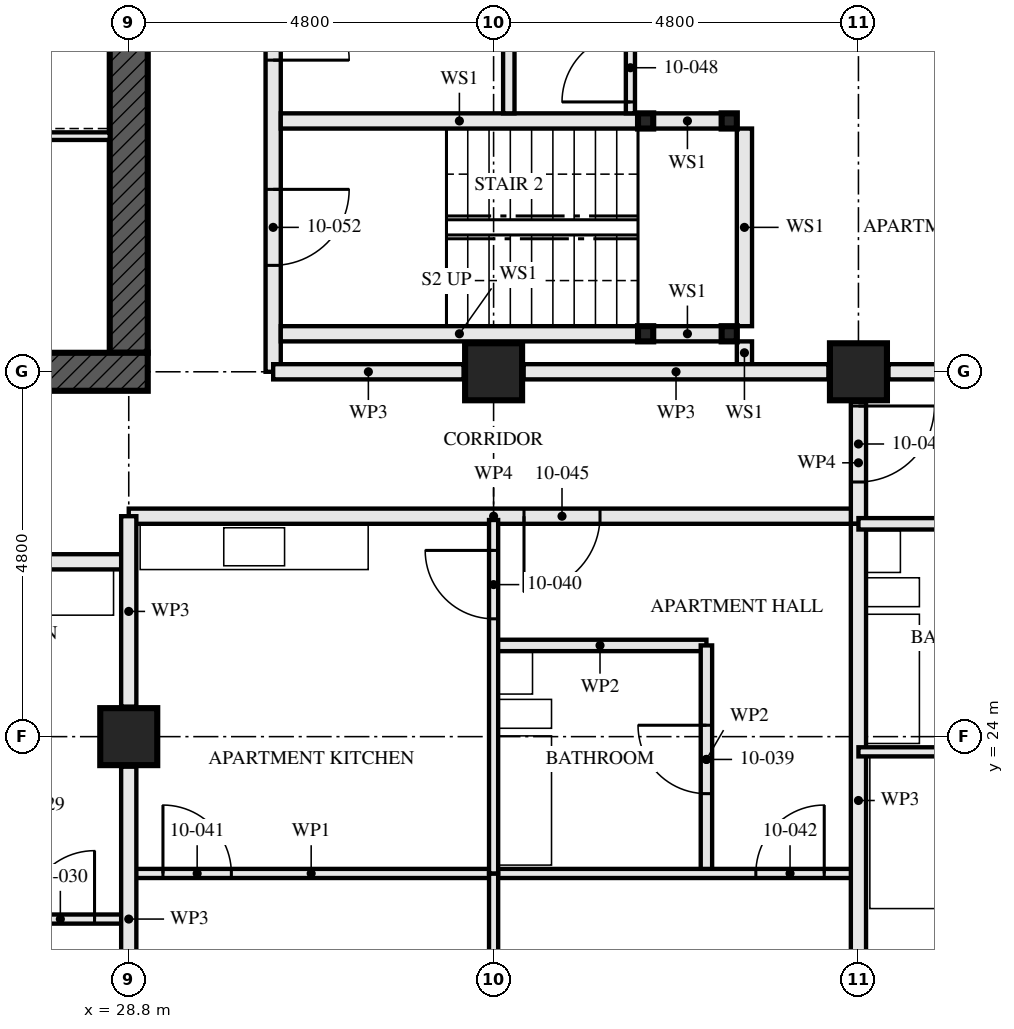
"""IFC4 building model, lengths in metres.
Left out: names, types, materials, properties, quantities, classifications, styles, units other than length and angle.
Written with IfcOpenShell. Run it as: python <this file> out.ifc"""

import sys

from ifc_helpers import new_model, si_unit, direction, frame, frame_2d, origin, origin_2d, place, context, subcontext, project, spatial, rectangle, hollow_rectangle, extrude, element, fill, save


model = new_model("IFC4")
c1 = context("Model", 3, precision=1e-05, world=origin(), true_north=direction((0.0, 1.0)))
c2 = subcontext(c1, "Body", "Model", "MODEL_VIEW")
j1 = project(units=[si_unit("LENGTHUNIT", "METRE"), si_unit("PLANEANGLEUNIT", "RADIAN")], contexts=[c1])
p1 = place(None, origin())
s1 = spatial("IfcSite", under=j1, at=p1, CompositionType="ELEMENT")
p2 = place(p1, origin())
s2 = spatial("IfcBuilding", under=s1, at=p2, CompositionType="ELEMENT")
p3 = place(p2, frame((0.0, 0.0, 41.0)))
s3 = spatial("IfcBuildingStorey", under=s2, at=p3, CompositionType="ELEMENT", Elevation=41.0)
for number, where, z_axis, x_axis in (
    (1, (28.8, 24.0, 0.0), (0.0, 0.0, 1.0), (1.0, 0.0, 0.0)),
    (2, (33.6, 28.8, 0.0), (0.0, 0.0, 1.0), (0.0, 1.0, 0.0)),
    (3, (38.4, 28.8, 0.0), (0.0, 0.0, 1.0), (0.0, 1.0, 0.0)),
):
    element("IfcColumn", number, at=place(p3, frame(where, z_axis=z_axis, x_axis=x_axis)), inside=s3, PredefinedType="COLUMN", context=c2, shape_type="SweptSolid", body=[
        extrude(hollow_rectangle(XDim=0.75, YDim=0.75, WallThickness=0.08, at=origin_2d()), origin(), (0.0, 0.0, 1.0), 3.5),
    ])
p4 = place(p3, frame((14.15, 28.8, -0.17), z_axis=(0.0, 0.0, 1.0), x_axis=(1.0, 0.0, 0.0)))
e4 = element("IfcWall", 4, at=p4, inside=s3, PredefinedType="SHEAR", context=c2, shape_type="SweptSolid", body=[
    extrude(rectangle(XDim=14.9, YDim=0.5, at=frame_2d((7.45, 0.0))), origin(), (0.0, 0.0, 1.0), 3.5),
])
p5 = place(p4, frame((6.85, 0.0, 0.17)))
e5 = element("IfcOpeningElement", 5, at=p5, cuts=e4, PredefinedType="OPENING", context=c2, shape_type="SweptSolid", body=[
    extrude(rectangle(XDim=1.2, YDim=2.1, at=frame_2d((0.6, 1.05))), frame((0.0, 0.26, 0.0), z_axis=(0.0, -1.0, 0.0), x_axis=(1.0, 0.0, 0.0)), (0.0, 0.0, 1.0), 0.521),
])
p6 = place(p3, frame((28.8, 29.05, -0.17), z_axis=(0.0, 0.0, 1.0), x_axis=(0.0, 1.0, 0.0)))
e6 = element("IfcWall", 6, at=p6, inside=s3, PredefinedType="SHEAR", context=c2, shape_type="SweptSolid", body=[
    extrude(rectangle(XDim=13.9, YDim=0.5, at=frame_2d((6.95, 0.0))), origin(), (0.0, 0.0, 1.0), 3.5),
])
p7 = place(p6, frame((6.35, 0.0, 0.17)))
e7 = element("IfcOpeningElement", 7, at=p7, cuts=e6, PredefinedType="OPENING", context=c2, shape_type="SweptSolid", body=[
    extrude(rectangle(XDim=1.2, YDim=2.1, at=frame_2d((0.6, 1.05))), frame((0.0, 0.26, 0.0), z_axis=(0.0, -1.0, 0.0), x_axis=(1.0, 0.0, 0.0)), (0.0, 0.0, 1.0), 0.521),
])
for number, where, z_axis, x_axis in (
    (8, (36.7, 29.3, 0.0), (0.0, 0.0, 1.0), (1.0, 0.0, 0.0)),
    (9, (36.7, 32.1, 0.0), (0.0, 0.0, 1.0), (1.0, 0.0, 0.0)),
    (10, (35.6, 29.3, 0.0), (0.0, 0.0, 1.0), (1.0, 0.0, 0.0)),
    (11, (35.6, 32.1, 0.0), (0.0, 0.0, 1.0), (1.0, 0.0, 0.0)),
):
    element("IfcColumn", number, at=place(p3, frame(where, z_axis=z_axis, x_axis=x_axis)), inside=s3, PredefinedType="COLUMN", context=c2, shape_type="SweptSolid", body=[
        extrude(hollow_rectangle(XDim=0.2, YDim=0.2, WallThickness=0.008, at=origin_2d()), origin(), (0.0, 0.0, 1.0), 3.33),
    ])
p8 = place(p3, frame((24.0, 21.6, 0.0), z_axis=(0.0, 0.0, 1.0), x_axis=(1.0, 0.0, 0.0)))
e12 = element("IfcWall", 12, at=p8, inside=s3, PredefinedType="PARTITIONING", context=c2, shape_type="SweptSolid", body=[
    extrude(rectangle(XDim=4.8, YDim=0.12, at=frame_2d((2.4, 0.0))), origin(), (0.0, 0.0, 1.0), 3.33),
])
p9 = place(p8, frame((3.45, 0.0, 0.0)))
e13 = element("IfcOpeningElement", 13, at=p9, cuts=e12, PredefinedType="OPENING", context=c2, shape_type="SweptSolid", body=[
    extrude(rectangle(XDim=0.9, YDim=2.1, at=frame_2d((0.45, 1.05))), frame((0.0, 0.071, 0.0), z_axis=(0.0, -1.0, 0.0), x_axis=(1.0, 0.0, 0.0)), (0.0, 0.0, 1.0), 0.141),
])
p10 = place(p3, frame((17.8, 26.3, 0.0), z_axis=(0.0, 0.0, 1.0), x_axis=(1.0, 0.0, 0.0)))
e14 = element("IfcWall", 14, at=p10, inside=s3, PredefinedType="PARTITIONING", context=c2, shape_type="SweptSolid", body=[
    extrude(rectangle(XDim=11.0, YDim=0.2, at=frame_2d((5.5, 0.0))), origin(), (0.0, 0.0, 1.0), 2.55),
])
p11 = place(p10, frame((1.8, 0.0, 0.0)))
e15 = element("IfcOpeningElement", 15, at=p11, cuts=e14, PredefinedType="OPENING", context=c2, shape_type="SweptSolid", body=[
    extrude(rectangle(XDim=1.0, YDim=2.1, at=frame_2d((0.5, 1.05))), frame((0.0, 0.111, 0.0), z_axis=(0.0, -1.0, 0.0), x_axis=(1.0, 0.0, 0.0)), (0.0, 0.0, 1.0), 0.221),
])
p12 = place(p10, frame((6.6, 0.0, 0.0)))
e16 = element("IfcOpeningElement", 16, at=p12, cuts=e14, PredefinedType="OPENING", context=c2, shape_type="SweptSolid", body=[
    extrude(rectangle(XDim=1.0, YDim=2.1, at=frame_2d((0.5, 1.05))), frame((0.0, 0.111, 0.0), z_axis=(0.0, -1.0, 0.0), x_axis=(1.0, 0.0, 0.0)), (0.0, 0.0, 1.0), 0.221),
])
p13 = place(p3, frame((36.4, 22.2, 0.0), z_axis=(0.0, 0.0, 1.0), x_axis=(0.0, 1.0, 0.0)))
e17 = element("IfcWall", 17, at=p13, inside=s3, PredefinedType="PARTITIONING", context=c2, shape_type="SweptSolid", body=[
    extrude(rectangle(XDim=3.0, YDim=0.15, at=frame_2d((1.5, 0.0))), origin(), (0.0, 0.0, 1.0), 2.55),
])
p14 = place(p13, frame((1.05, 0.0, 0.0)))
e18 = element("IfcOpeningElement", 18, at=p14, cuts=e17, PredefinedType="OPENING", context=c2, shape_type="SweptSolid", body=[
    extrude(rectangle(XDim=0.9, YDim=2.1, at=frame_2d((0.45, 1.05))), frame((0.0, 0.085, 0.0), z_axis=(0.0, -1.0, 0.0), x_axis=(1.0, 0.0, 0.0)), (0.0, 0.0, 1.0), 0.171),
])
p15 = place(p3, frame((33.6, 25.2, 0.0), z_axis=(0.0, 0.0, 1.0), x_axis=(1.0, 0.0, 0.0)))
e19 = element("IfcWall", 19, at=p15, inside=s3, PredefinedType="PARTITIONING", context=c2, shape_type="SweptSolid", body=[
    extrude(rectangle(XDim=2.8, YDim=0.15, at=frame_2d((1.4, 0.0))), origin(), (0.0, 0.0, 1.0), 3.33),
])
p16 = place(p3, frame((33.6, 22.2, 0.0), z_axis=(0.0, 0.0, 1.0), x_axis=(0.0, 1.0, 0.0)))
e20 = element("IfcWall", 20, at=p16, inside=s3, PredefinedType="PARTITIONING", context=c2, shape_type="SweptSolid", body=[
    extrude(rectangle(XDim=4.65, YDim=0.12, at=frame_2d((2.325, 0.0))), origin(), (0.0, 0.0, 1.0), 2.55),
])
p17 = place(p16, frame((3.35, 0.0, 0.0)))
e21 = element("IfcOpeningElement", 21, at=p17, cuts=e20, PredefinedType="OPENING", context=c2, shape_type="SweptSolid", body=[
    extrude(rectangle(XDim=0.9, YDim=2.1, at=frame_2d((0.45, 1.05))), frame((0.0, 0.071, 0.0), z_axis=(0.0, -1.0, 0.0), x_axis=(1.0, 0.0, 0.0)), (0.0, 0.0, 1.0), 0.141),
])
p18 = place(p3, frame((28.8, 22.2, 0.0), z_axis=(0.0, 0.0, 1.0), x_axis=(1.0, 0.0, 0.0)))
e22 = element("IfcWall", 22, at=p18, inside=s3, PredefinedType="PARTITIONING", context=c2, shape_type="SweptSolid", body=[
    extrude(rectangle(XDim=4.8, YDim=0.12, at=frame_2d((2.4, 0.0))), origin(), (0.0, 0.0, 1.0), 3.33),
])
p19 = place(p18, frame((0.45, 0.0, 0.0)))
e23 = element("IfcOpeningElement", 23, at=p19, cuts=e22, PredefinedType="OPENING", context=c2, shape_type="SweptSolid", body=[
    extrude(rectangle(XDim=0.9, YDim=2.1, at=frame_2d((0.45, 1.05))), frame((0.0, 0.071, 0.0), z_axis=(0.0, -1.0, 0.0), x_axis=(1.0, 0.0, 0.0)), (0.0, 0.0, 1.0), 0.141),
])
p20 = place(p3, frame((33.6, 22.2, 0.0), z_axis=(0.0, 0.0, 1.0), x_axis=(1.0, 0.0, 0.0)))
e24 = element("IfcWall", 24, at=p20, inside=s3, PredefinedType="PARTITIONING", context=c2, shape_type="SweptSolid", body=[
    extrude(rectangle(XDim=4.8, YDim=0.12, at=frame_2d((2.4, 0.0))), origin(), (0.0, 0.0, 1.0), 3.33),
])
p21 = place(p20, frame((3.45, 0.0, 0.0)))
e25 = element("IfcOpeningElement", 25, at=p21, cuts=e24, PredefinedType="OPENING", context=c2, shape_type="SweptSolid", body=[
    extrude(rectangle(XDim=0.9, YDim=2.1, at=frame_2d((0.45, 1.05))), frame((0.0, 0.071, 0.0), z_axis=(0.0, -1.0, 0.0), x_axis=(1.0, 0.0, 0.0)), (0.0, 0.0, 1.0), 0.141),
])
p22 = place(p3, frame((33.6, 14.72, 0.0), z_axis=(0.0, 0.0, 1.0), x_axis=(0.0, 1.0, 0.0)))
e26 = element("IfcWall", 26, at=p22, inside=s3, PredefinedType="PARTITIONING", context=c2, shape_type="SweptSolid", body=[
    extrude(rectangle(XDim=7.48, YDim=0.12, at=frame_2d((3.74, 0.0))), origin(), (0.0, 0.0, 1.0), 2.55),
])
p23 = place(p3, frame((38.4, 19.52, 0.0), z_axis=(0.0, 0.0, 1.0), x_axis=(0.0, 1.0, 0.0)))
e27 = element("IfcWall", 27, at=p23, inside=s3, PredefinedType="PARTITIONING", context=c2, shape_type="SweptSolid", body=[
    extrude(rectangle(XDim=7.28, YDim=0.2, at=frame_2d((3.64, 0.0))), origin(), (0.0, 0.0, 1.0), 2.55),
])
p24 = place(p3, frame((38.4, 26.8, 0.0), z_axis=(0.0, 0.0, 1.0), x_axis=(1.0, 0.0, 0.0)))
e28 = element("IfcWall", 28, at=p24, inside=s3, PredefinedType="PARTITIONING", context=c2, shape_type="SweptSolid", body=[
    extrude(rectangle(XDim=2.8, YDim=0.15, at=frame_2d((1.4, 0.0))), origin(), (0.0, 0.0, 1.0), 3.33),
])
p25 = place(p3, frame((38.4, 23.8, 0.0), z_axis=(0.0, 0.0, 1.0), x_axis=(1.0, 0.0, 0.0)))
e29 = element("IfcWall", 29, at=p25, inside=s3, PredefinedType="PARTITIONING", context=c2, shape_type="SweptSolid", body=[
    extrude(rectangle(XDim=4.48, YDim=0.12, at=frame_2d((2.24, 0.0))), origin(), (0.0, 0.0, 1.0), 3.33),
])
p26 = place(p25, frame((2.975, 0.0, 0.0)))
e30 = element("IfcOpeningElement", 30, at=p26, cuts=e29, PredefinedType="OPENING", context=c2, shape_type="SweptSolid", body=[
    extrude(rectangle(XDim=0.9, YDim=2.1, at=frame_2d((0.45, 1.05))), frame((0.0, 0.071, 0.0), z_axis=(0.0, -1.0, 0.0), x_axis=(1.0, 0.0, 0.0)), (0.0, 0.0, 1.0), 0.141),
])
p27 = place(p3, frame((28.8, 26.9, 0.0), z_axis=(0.0, 0.0, 1.0), x_axis=(1.0, 0.0, 0.0)))
e31 = element("IfcWall", 31, at=p27, inside=s3, PredefinedType="PARTITIONING", context=c2, shape_type="SweptSolid", body=[
    extrude(rectangle(XDim=9.6, YDim=0.2, at=frame_2d((4.8, 0.0))), origin(), (0.0, 0.0, 1.0), 3.33),
])
p28 = place(p27, frame((5.2, 0.0, 0.0)))
e32 = element("IfcOpeningElement", 32, at=p28, cuts=e31, PredefinedType="OPENING", context=c2, shape_type="SweptSolid", body=[
    extrude(rectangle(XDim=1.0, YDim=2.1, at=frame_2d((0.5, 1.05))), frame((0.0, 0.111, 0.0), z_axis=(0.0, -1.0, 0.0), x_axis=(1.0, 0.0, 0.0)), (0.0, 0.0, 1.0), 0.221),
])
p29 = place(p3, frame((38.4, 26.8, 0.0), z_axis=(0.0, 0.0, 1.0), x_axis=(0.0, 1.0, 0.0)))
e33 = element("IfcWall", 33, at=p29, inside=s3, PredefinedType="PARTITIONING", context=c2, shape_type="SweptSolid", body=[
    extrude(rectangle(XDim=1.605, YDim=0.2, at=frame_2d((0.802, 0.0))), origin(), (0.0, 0.0, 1.0), 3.33),
])
p30 = place(p29, frame((0.55, 0.0, 0.0)))
e34 = element("IfcOpeningElement", 34, at=p30, cuts=e33, PredefinedType="OPENING", context=c2, shape_type="SweptSolid", body=[
    extrude(rectangle(XDim=1.0, YDim=2.1, at=frame_2d((0.5, 1.05))), frame((0.0, 0.111, 0.0), z_axis=(0.0, -1.0, 0.0), x_axis=(1.0, 0.0, 0.0)), (0.0, 0.0, 1.0), 0.221),
])
p31 = place(p3, frame((36.6, 29.3, 0.0), z_axis=(0.0, 0.0, 1.0), x_axis=(-1.0, 0.0, 0.0)))
e35 = element("IfcWall", 35, at=p31, inside=s3, PredefinedType="SOLIDWALL", context=c2, shape_type="SweptSolid", body=[
    extrude(rectangle(XDim=0.9, YDim=0.2, at=frame_2d((0.45, 0.0))), origin(), (0.0, 0.0, 1.0), 2.99),
])
p32 = place(p3, frame((35.5, 29.3, 0.0), z_axis=(0.0, 0.0, 1.0), x_axis=(-1.0, 0.0, 0.0)))
e36 = element("IfcWall", 36, at=p32, inside=s3, PredefinedType="SOLIDWALL", context=c2, shape_type="SweptSolid", body=[
    extrude(rectangle(XDim=4.7, YDim=0.2, at=frame_2d((2.35, 0.0))), origin(), (0.0, 0.0, 1.0), 2.99),
])
p33 = place(p3, frame((36.6, 32.1, 0.0), z_axis=(0.0, 0.0, 1.0), x_axis=(-1.0, 0.0, 0.0)))
e37 = element("IfcWall", 37, at=p33, inside=s3, PredefinedType="SOLIDWALL", context=c2, shape_type="SweptSolid", body=[
    extrude(rectangle(XDim=0.9, YDim=0.2, at=frame_2d((0.45, 0.0))), origin(), (0.0, 0.0, 1.0), 2.99),
])
p34 = place(p3, frame((35.5, 32.1, 0.0), z_axis=(0.0, 0.0, 1.0), x_axis=(-1.0, 0.0, 0.0)))
e38 = element("IfcWall", 38, at=p34, inside=s3, PredefinedType="SOLIDWALL", context=c2, shape_type="SweptSolid", body=[
    extrude(rectangle(XDim=4.7, YDim=0.2, at=frame_2d((2.35, 0.0))), origin(), (0.0, 0.0, 1.0), 2.99),
])
p35 = place(p3, frame((36.9, 28.9, 0.0), z_axis=(0.0, 0.0, 1.0), x_axis=(0.0, 1.0, 0.0)))
e39 = element("IfcWall", 39, at=p35, inside=s3, PredefinedType="SOLIDWALL", context=c2, shape_type="SweptSolid", body=[
    extrude(rectangle(XDim=0.3, YDim=0.2, at=frame_2d((0.15, 0.0))), origin(), (0.0, 0.0, 1.0), 3.33),
])
p36 = place(p3, frame((36.9, 29.4, 0.0), z_axis=(0.0, 0.0, 1.0), x_axis=(0.0, 1.0, 0.0)))
e40 = element("IfcWall", 40, at=p36, inside=s3, PredefinedType="SOLIDWALL", context=c2, shape_type="SweptSolid", body=[
    extrude(rectangle(XDim=2.6, YDim=0.2, at=frame_2d((1.3, 0.0))), origin(), (0.0, 0.0, 1.0), 3.33),
])
p37 = place(p3, frame((33.8, 32.2, 0.0), z_axis=(0.0, 0.0, 1.0), x_axis=(0.0, 1.0, 0.0)))
e41 = element("IfcWall", 41, at=p37, inside=s3, PredefinedType="PARTITIONING", context=c2, shape_type="SweptSolid", body=[
    extrude(rectangle(XDim=2.4, YDim=0.15, at=frame_2d((1.2, 0.0))), origin(), (0.0, 0.0, 1.0), 2.55),
])
p38 = place(p3, frame((35.4, 32.2, 0.0), z_axis=(0.0, 0.0, 1.0), x_axis=(0.0, 1.0, 0.0)))
e42 = element("IfcWall", 42, at=p38, inside=s3, PredefinedType="PARTITIONING", context=c2, shape_type="SweptSolid", body=[
    extrude(rectangle(XDim=1.4, YDim=0.12, at=frame_2d((0.7, 0.0))), origin(), (0.0, 0.0, 1.0), 3.33),
])
p39 = place(p38, frame((0.15, 0.0, 0.0)))
e43 = element("IfcOpeningElement", 43, at=p39, cuts=e42, PredefinedType="OPENING", context=c2, shape_type="SweptSolid", body=[
    extrude(rectangle(XDim=0.9, YDim=2.1, at=frame_2d((0.45, 1.05))), frame((0.0, 0.071, 0.0), z_axis=(0.0, -1.0, 0.0), x_axis=(1.0, 0.0, 0.0)), (0.0, 0.0, 1.0), 0.141),
])
p40 = place(p3, frame((30.7, 28.8, 0.0), z_axis=(0.0, 0.0, 1.0), x_axis=(0.0, 1.0, 0.0)))
e44 = element("IfcWall", 44, at=p40, inside=s3, PredefinedType="PARTITIONING", context=c2, shape_type="SweptSolid", body=[
    extrude(rectangle(XDim=14.4, YDim=0.2, at=frame_2d((7.2, 0.0))), origin(), (0.0, 0.0, 1.0), 2.55),
])
p41 = place(p40, frame((1.4, 0.0, 0.0)))
e45 = element("IfcOpeningElement", 45, at=p41, cuts=e44, PredefinedType="OPENING", context=c2, shape_type="SweptSolid", body=[
    extrude(rectangle(XDim=1.0, YDim=2.1, at=frame_2d((0.5, 1.05))), frame((0.0, 0.111, 0.0), z_axis=(0.0, -1.0, 0.0), x_axis=(1.0, 0.0, 0.0)), (0.0, 0.0, 1.0), 0.221),
])
p42 = place(p40, frame((4.1, 0.0, 0.0)))
e46 = element("IfcOpeningElement", 46, at=p42, cuts=e44, PredefinedType="OPENING", context=c2, shape_type="SweptSolid", body=[
    extrude(rectangle(XDim=1.0, YDim=2.1, at=frame_2d((0.5, 1.05))), frame((0.0, 0.111, 0.0), z_axis=(0.0, -1.0, 0.0), x_axis=(1.0, 0.0, 0.0)), (0.0, 0.0, 1.0), 0.221),
])
p43 = place(p40, frame((5.975, 0.0, 0.0)))
e47 = element("IfcOpeningElement", 47, at=p43, cuts=e44, PredefinedType="OPENING", context=c2, shape_type="SweptSolid", body=[
    extrude(rectangle(XDim=1.0, YDim=2.1, at=frame_2d((0.5, 1.05))), frame((0.0, 0.111, 0.0), z_axis=(0.0, -1.0, 0.0), x_axis=(1.0, 0.0, 0.0)), (0.0, 0.0, 1.0), 0.221),
])
p44 = place(p40, frame((10.0, 0.0, 0.0)))
e48 = element("IfcOpeningElement", 48, at=p44, cuts=e44, PredefinedType="OPENING", context=c2, shape_type="SweptSolid", body=[
    extrude(rectangle(XDim=1.0, YDim=2.1, at=frame_2d((0.5, 1.05))), frame((0.0, 0.111, 0.0), z_axis=(0.0, -1.0, 0.0), x_axis=(1.0, 0.0, 0.0)), (0.0, 0.0, 1.0), 0.221),
])
p45 = place(p3, frame((23.15, 31.9, 0.0), z_axis=(0.0, 0.0, 1.0), x_axis=(1.0, 0.0, 0.0)))
e49 = element("IfcWall", 49, at=p45, inside=s3, PredefinedType="SOLIDWALL", context=c2, shape_type="SweptSolid", body=[
    extrude(rectangle(XDim=5.4, YDim=0.1, at=frame_2d((2.7, 0.0))), origin(), (0.0, 0.0, 1.0), 3.33),
])
p46 = place(p3, frame((28.8, 19.595, 0.0), z_axis=(0.0, 0.0, 1.0), x_axis=(0.0, 1.0, 0.0)))
e50 = element("IfcWall", 50, at=p46, inside=s3, PredefinedType="PARTITIONING", context=c2, shape_type="SweptSolid", body=[
    extrude(rectangle(XDim=4.01, YDim=0.2, at=frame_2d((2.005, 0.0))), origin(), (0.0, 0.0, 1.0), 2.32),
])
p47 = place(p3, frame((28.8, 24.395, 0.0), z_axis=(0.0, 0.0, 1.0), x_axis=(0.0, 1.0, 0.0)))
e51 = element("IfcWall", 51, at=p47, inside=s3, PredefinedType="PARTITIONING", context=c2, shape_type="SweptSolid", body=[
    extrude(rectangle(XDim=2.505, YDim=0.2, at=frame_2d((1.252, 0.0))), origin(), (0.0, 0.0, 1.0), 2.32),
])
p48 = place(p3, frame((42.88, 28.8, 0.0), z_axis=(0.0, 0.0, 1.0), x_axis=(-1.0, 0.0, 0.0)))
e52 = element("IfcWall", 52, at=p48, inside=s3, PredefinedType="PARTITIONING", context=c2, shape_type="SweptSolid", body=[
    extrude(rectangle(XDim=4.085, YDim=0.2, at=frame_2d((2.042, 0.0))), origin(), (0.0, 0.0, 1.0), 2.32),
])
p49 = place(p3, frame((38.005, 28.8, 0.0), z_axis=(0.0, 0.0, 1.0), x_axis=(-1.0, 0.0, 0.0)))
e53 = element("IfcWall", 53, at=p49, inside=s3, PredefinedType="PARTITIONING", context=c2, shape_type="SweptSolid", body=[
    extrude(rectangle(XDim=4.01, YDim=0.2, at=frame_2d((2.005, 0.0))), origin(), (0.0, 0.0, 1.0), 2.32),
])
p50 = place(p3, frame((33.205, 28.8, 0.0), z_axis=(0.0, 0.0, 1.0), x_axis=(-1.0, 0.0, 0.0)))
e54 = element("IfcWall", 54, at=p50, inside=s3, PredefinedType="PARTITIONING", context=c2, shape_type="SweptSolid", body=[
    extrude(rectangle(XDim=2.505, YDim=0.2, at=frame_2d((1.252, 0.0))), origin(), (0.0, 0.0, 1.0), 2.32),
])
p51 = place(p9, origin())
e55 = element("IfcDoor", 55, at=p51, inside=s3, OperationType="SINGLE_SWING_LEFT", PredefinedType="DOOR", context=c2, shape_type="SweptSolid", body=[
    extrude(rectangle(XDim=0.9, YDim=2.1, at=frame_2d((0.45, 1.05))), frame((0.0, 0.022, 0.0), z_axis=(0.0, -1.0, 0.0), x_axis=(1.0, 0.0, 0.0)), (0.0, 0.0, 1.0), 0.044),
])
fill(e13, e55)
p52 = place(p14, origin())
e56 = element("IfcDoor", 56, at=p52, inside=s3, OperationType="SINGLE_SWING_LEFT", PredefinedType="DOOR", context=c2, shape_type="SweptSolid", body=[
    extrude(rectangle(XDim=0.9, YDim=2.1, at=frame_2d((0.45, 1.05))), frame((0.0, 0.022, 0.0), z_axis=(0.0, -1.0, 0.0), x_axis=(1.0, 0.0, 0.0)), (0.0, 0.0, 1.0), 0.044),
])
fill(e18, e56)
p53 = place(p17, origin())
e57 = element("IfcDoor", 57, at=p53, inside=s3, OperationType="SINGLE_SWING_LEFT", PredefinedType="DOOR", context=c2, shape_type="SweptSolid", body=[
    extrude(rectangle(XDim=0.9, YDim=2.1, at=frame_2d((0.45, 1.05))), frame((0.0, 0.022, 0.0), z_axis=(0.0, -1.0, 0.0), x_axis=(1.0, 0.0, 0.0)), (0.0, 0.0, 1.0), 0.044),
])
fill(e21, e57)
p54 = place(p19, origin())
e58 = element("IfcDoor", 58, at=p54, inside=s3, OperationType="SINGLE_SWING_RIGHT", PredefinedType="DOOR", context=c2, shape_type="SweptSolid", body=[
    extrude(rectangle(XDim=0.9, YDim=2.1, at=frame_2d((0.45, 1.05))), frame((0.0, 0.022, 0.0), z_axis=(0.0, -1.0, 0.0), x_axis=(1.0, 0.0, 0.0)), (0.0, 0.0, 1.0), 0.044),
])
fill(e23, e58)
p55 = place(p21, origin())
e59 = element("IfcDoor", 59, at=p55, inside=s3, OperationType="SINGLE_SWING_LEFT", PredefinedType="DOOR", context=c2, shape_type="SweptSolid", body=[
    extrude(rectangle(XDim=0.9, YDim=2.1, at=frame_2d((0.45, 1.05))), frame((0.0, 0.022, 0.0), z_axis=(0.0, -1.0, 0.0), x_axis=(1.0, 0.0, 0.0)), (0.0, 0.0, 1.0), 0.044),
])
fill(e25, e59)
p56 = place(p28, frame((1.0, 0.0, 0.0), z_axis=(0.0, 0.0, 1.0), x_axis=(-1.0, 0.0, 0.0)))
e60 = element("IfcDoor", 60, at=p56, inside=s3, OperationType="SINGLE_SWING_LEFT", PredefinedType="DOOR", context=c2, shape_type="SweptSolid", body=[
    extrude(rectangle(XDim=1.0, YDim=2.1, at=frame_2d((0.5, 1.05))), frame((0.0, 0.027, 0.0), z_axis=(0.0, -1.0, 0.0), x_axis=(1.0, 0.0, 0.0)), (0.0, 0.0, 1.0), 0.054),
])
fill(e32, e60)
p57 = place(p30, frame((1.0, 0.0, 0.0), z_axis=(0.0, 0.0, 1.0), x_axis=(-1.0, 0.0, 0.0)))
e61 = element("IfcDoor", 61, at=p57, inside=s3, OperationType="SINGLE_SWING_RIGHT", PredefinedType="DOOR", context=c2, shape_type="SweptSolid", body=[
    extrude(rectangle(XDim=1.0, YDim=2.1, at=frame_2d((0.5, 1.05))), frame((0.0, 0.027, 0.0), z_axis=(0.0, -1.0, 0.0), x_axis=(1.0, 0.0, 0.0)), (0.0, 0.0, 1.0), 0.054),
])
fill(e34, e61)
p58 = place(p39, origin())
e62 = element("IfcDoor", 62, at=p58, inside=s3, OperationType="SINGLE_SWING_RIGHT", PredefinedType="DOOR", context=c2, shape_type="SweptSolid", body=[
    extrude(rectangle(XDim=0.9, YDim=2.1, at=frame_2d((0.45, 1.05))), frame((0.0, 0.022, 0.0), z_axis=(0.0, -1.0, 0.0), x_axis=(1.0, 0.0, 0.0)), (0.0, 0.0, 1.0), 0.044),
])
fill(e43, e62)
p59 = place(p41, frame((1.0, 0.0, 0.0), z_axis=(0.0, 0.0, 1.0), x_axis=(-1.0, 0.0, 0.0)))
e63 = element("IfcDoor", 63, at=p59, inside=s3, OperationType="SINGLE_SWING_RIGHT", PredefinedType="DOOR", context=c2, shape_type="SweptSolid", body=[
    extrude(rectangle(XDim=1.0, YDim=2.1, at=frame_2d((0.5, 1.05))), frame((0.0, 0.032, 0.0), z_axis=(0.0, -1.0, 0.0), x_axis=(1.0, 0.0, 0.0)), (0.0, 0.0, 1.0), 0.064),
])
fill(e45, e63)
p60 = place(p42, frame((1.0, 0.0, 0.0), z_axis=(0.0, 0.0, 1.0), x_axis=(-1.0, 0.0, 0.0)))
e64 = element("IfcDoor", 64, at=p60, inside=s3, OperationType="SINGLE_SWING_LEFT", PredefinedType="DOOR", context=c2, shape_type="SweptSolid", body=[
    extrude(rectangle(XDim=1.0, YDim=2.1, at=frame_2d((0.5, 1.05))), frame((0.0, 0.027, 0.0), z_axis=(0.0, -1.0, 0.0), x_axis=(1.0, 0.0, 0.0)), (0.0, 0.0, 1.0), 0.054),
])
fill(e46, e64)
save(model, sys.argv[1])
